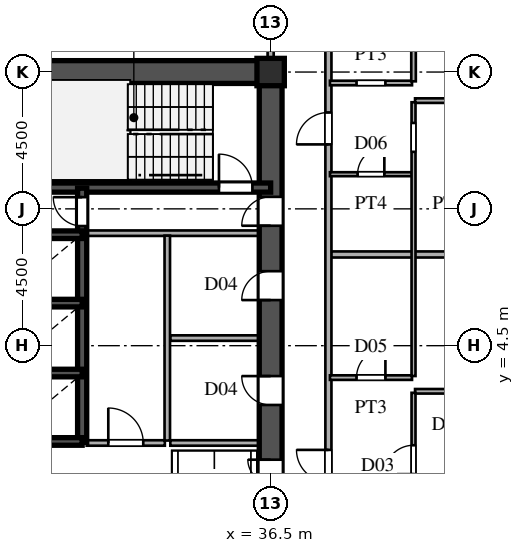
"""IFC4 building model, lengths in metres.
Left out: names, types, materials, properties, quantities, classifications, styles, units other than length and angle.
Written with IfcOpenShell. Run it as: python <this file> out.ifc"""

import sys

from ifc_helpers import new_model, si_unit, direction, frame, frame_2d, origin, origin_2d, place, context, subcontext, project, spatial, rectangle, i_section, extrude, source, transform, mapped, element, fill, save


model = new_model("IFC4")
c1 = context("Model", 3, precision=1e-05, world=origin(), true_north=direction((0.0, 1.0)))
c2 = subcontext(c1, "Body", "Model", "MODEL_VIEW")
j1 = project(units=[si_unit("LENGTHUNIT", "METRE"), si_unit("PLANEANGLEUNIT", "RADIAN")], contexts=[c1])
p1 = place(None, origin())
s1 = spatial("IfcSite", under=j1, at=p1, CompositionType="ELEMENT")
p2 = place(p1, origin())
s2 = spatial("IfcBuilding", under=s1, at=p2, CompositionType="ELEMENT")
p3 = place(p2, frame((0.0, 0.0, 29.7)))
s3 = spatial("IfcBuildingStorey", under=s2, at=p3, CompositionType="ELEMENT", Elevation=29.7)
m1 = source(origin(), c2, "Body", "SweptSolid", [
    extrude(i_section(OverallWidth=0.9, OverallDepth=0.9, WebThickness=0.036, FlangeThickness=0.055, at=origin_2d()), origin(), (0.0, 0.0, 1.0), 3.6),
])
p4 = place(p3, frame((36.5, 13.5, 0.0), z_axis=(0.0, 0.0, 1.0), x_axis=(1.0, 0.0, 0.0)))
e1 = element("IfcColumn", 1, at=p4, inside=s3, PredefinedType="COLUMN", context=c2, shape_type="MappedRepresentation", body=[
    mapped(m1, transform((0.0, 0.0, 0.0), scale=1.0)),
])
p5 = place(p3, frame((27.5, 13.5, 0.0), z_axis=(0.0, 0.0, 1.0), x_axis=(1.0, 0.0, 0.0)))
e2 = element("IfcWall", 2, at=p5, inside=s3, PredefinedType="SHEAR", context=c2, shape_type="SweptSolid", body=[
    extrude(rectangle(XDim=9.0, YDim=0.75, at=frame_2d((4.5, 0.0))), origin(), (0.0, 0.0, 1.0), 3.38),
])
p6 = place(p3, frame((36.5, -1.3, 0.0), z_axis=(0.0, 0.0, 1.0), x_axis=(0.0, 1.0, 0.0)))
e3 = element("IfcWall", 3, at=p6, inside=s3, PredefinedType="SHEAR", context=c2, shape_type="SweptSolid", body=[
    extrude(rectangle(XDim=2.6, YDim=0.75, at=frame_2d((1.3, 0.0))), origin(), (0.0, 0.0, 1.0), 3.38),
])
p7 = place(p6, frame((0.55, 0.0, 0.0)))
e4 = element("IfcOpeningElement", 4, at=p7, cuts=e3, PredefinedType="OPENING", context=c2, shape_type="SweptSolid", body=[
    extrude(rectangle(XDim=1.5, YDim=2.3, at=frame_2d((0.75, 1.15))), frame((0.0, 0.385, 0.0), z_axis=(0.0, -1.0, 0.0), x_axis=(1.0, 0.0, 0.0)), (0.0, 0.0, 1.0), 0.77),
])
p8 = place(p3, frame((36.5, 8.2, 0.0), z_axis=(0.0, 0.0, 1.0), x_axis=(0.0, 1.0, 0.0)))
e5 = element("IfcWall", 5, at=p8, inside=s3, PredefinedType="SHEAR", context=c2, shape_type="SweptSolid", body=[
    extrude(rectangle(XDim=5.45, YDim=0.75, at=frame_2d((2.725, 0.0))), origin(), (0.0, 0.0, 1.0), 3.38),
])
p9 = place(p8, frame((0.245, 0.0, 0.0)))
e6 = element("IfcOpeningElement", 6, at=p9, cuts=e5, PredefinedType="OPENING", context=c2, shape_type="SweptSolid", body=[
    extrude(rectangle(XDim=0.95, YDim=2.15, at=frame_2d((0.475, 1.075))), frame((0.0, 0.385, 0.0), z_axis=(0.0, -1.0, 0.0), x_axis=(1.0, 0.0, 0.0)), (0.0, 0.0, 1.0), 0.77),
])
p10 = place(p3, frame((36.5, 1.3, 0.0), z_axis=(0.0, 0.0, 1.0), x_axis=(0.0, 1.0, 0.0)))
e7 = element("IfcWall", 7, at=p10, inside=s3, PredefinedType="SHEAR", context=c2, shape_type="SweptSolid", body=[
    extrude(rectangle(XDim=3.45, YDim=0.75, at=frame_2d((1.725, 0.0))), origin(), (0.0, 0.0, 1.0), 3.38),
])
p11 = place(p10, frame((1.25, 0.0, 0.0)))
e8 = element("IfcOpeningElement", 8, at=p11, cuts=e7, PredefinedType="OPENING", context=c2, shape_type="SweptSolid", body=[
    extrude(rectangle(XDim=0.95, YDim=2.15, at=frame_2d((0.475, 1.075))), frame((0.0, 0.385, 0.0), z_axis=(0.0, -1.0, 0.0), x_axis=(1.0, 0.0, 0.0)), (0.0, 0.0, 1.0), 0.77),
])
p12 = place(p3, frame((36.5, 4.75, 0.0), z_axis=(0.0, 0.0, 1.0), x_axis=(0.0, 1.0, 0.0)))
e9 = element("IfcWall", 9, at=p12, inside=s3, PredefinedType="SHEAR", context=c2, shape_type="SweptSolid", body=[
    extrude(rectangle(XDim=3.45, YDim=0.75, at=frame_2d((1.725, 0.0))), origin(), (0.0, 0.0, 1.0), 3.38),
])
p13 = place(p12, frame((1.25, 0.0, 0.0)))
e10 = element("IfcOpeningElement", 10, at=p13, cuts=e9, PredefinedType="OPENING", context=c2, shape_type="SweptSolid", body=[
    extrude(rectangle(XDim=0.95, YDim=2.15, at=frame_2d((0.475, 1.075))), frame((0.0, 0.385, 0.0), z_axis=(0.0, -1.0, 0.0), x_axis=(1.0, 0.0, 0.0)), (0.0, 0.0, 1.0), 0.77),
])
p14 = place(p3, frame((27.5, 9.7, 0.0), z_axis=(0.0, 0.0, 1.0), x_axis=(1.0, 0.0, 0.0)))
e11 = element("IfcWall", 11, at=p14, inside=s3, PredefinedType="SHEAR", context=c2, shape_type="SweptSolid", body=[
    extrude(rectangle(XDim=9.0, YDim=0.3, at=frame_2d((4.5, 0.0))), origin(), (0.0, 0.0, 1.0), 3.38),
])
p15 = place(p14, frame((7.3, 0.0, 0.0)))
e12 = element("IfcOpeningElement", 12, at=p15, cuts=e11, PredefinedType="OPENING", context=c2, shape_type="SweptSolid", body=[
    extrude(rectangle(XDim=1.1, YDim=2.2, at=frame_2d((0.55, 1.1))), frame((0.0, 0.16, 0.0), z_axis=(0.0, -1.0, 0.0), x_axis=(1.0, 0.0, 0.0)), (0.0, 0.0, 1.0), 0.32),
])
for number, where, z_axis, x_axis in (
    (13, (27.5, 1.35, 0.0), (0.0, 0.0, 1.0), (1.0, 0.0, 0.0)),
    (14, (27.5, 3.6, 0.0), (0.0, 0.0, 1.0), (1.0, 0.0, 0.0)),
    (15, (27.5, 5.9, 0.0), (0.0, 0.0, 1.0), (1.0, 0.0, 0.0)),
    (16, (27.5, 8.15, 0.0), (0.0, 0.0, 1.0), (1.0, 0.0, 0.0)),
):
    element("IfcWall", number, at=place(p3, frame(where, z_axis=z_axis, x_axis=x_axis)), inside=s3, PredefinedType="SHEAR", context=c2, shape_type="SweptSolid", body=[
        extrude(rectangle(XDim=2.8, YDim=0.25, at=frame_2d((1.4, 0.0))), origin(), (0.0, 0.0, 1.0), 3.38),
    ])
p16 = place(p3, frame((30.3, 1.32, 0.0), z_axis=(0.0, 0.0, 1.0), x_axis=(0.0, 1.0, 0.0)))
e17 = element("IfcWall", 17, at=p16, inside=s3, PredefinedType="SHEAR", context=c2, shape_type="SweptSolid", body=[
    extrude(rectangle(XDim=2.28, YDim=0.3, at=frame_2d((1.14, 0.0))), origin(), (0.0, 0.0, 1.0), 3.38),
])
p17 = place(p3, frame((30.3, 3.6, 0.0), z_axis=(0.0, 0.0, 1.0), x_axis=(0.0, 1.0, 0.0)))
e18 = element("IfcWall", 18, at=p17, inside=s3, PredefinedType="SHEAR", context=c2, shape_type="SweptSolid", body=[
    extrude(rectangle(XDim=2.3, YDim=0.3, at=frame_2d((1.15, 0.0))), origin(), (0.0, 0.0, 1.0), 3.38),
])
p18 = place(p3, frame((30.3, 5.9, 0.0), z_axis=(0.0, 0.0, 1.0), x_axis=(0.0, 1.0, 0.0)))
e19 = element("IfcWall", 19, at=p18, inside=s3, PredefinedType="SHEAR", context=c2, shape_type="SweptSolid", body=[
    extrude(rectangle(XDim=2.25, YDim=0.3, at=frame_2d((1.125, 0.0))), origin(), (0.0, 0.0, 1.0), 3.38),
])
p19 = place(p3, frame((30.3, 8.15, 0.0), z_axis=(0.0, 0.0, 1.0), x_axis=(0.0, 1.0, 0.0)))
e20 = element("IfcWall", 20, at=p19, inside=s3, PredefinedType="SHEAR", context=c2, shape_type="SweptSolid", body=[
    extrude(rectangle(XDim=1.53, YDim=0.3, at=frame_2d((0.765, 0.0))), origin(), (0.0, 0.0, 1.0), 3.38),
])
p20 = place(p19, frame((0.285, 0.0, 0.0)))
e21 = element("IfcOpeningElement", 21, at=p20, cuts=e20, PredefinedType="OPENING", context=c2, shape_type="SweptSolid", body=[
    extrude(rectangle(XDim=0.95, YDim=2.15, at=frame_2d((0.475, 1.075))), frame((0.0, 0.16, 0.0), z_axis=(0.0, -1.0, 0.0), x_axis=(1.0, 0.0, 0.0)), (0.0, 0.0, 1.0), 0.32),
])
p21 = place(p3, frame((30.45, 8.2, 0.0), z_axis=(0.0, 0.0, 1.0), x_axis=(1.0, 0.0, 0.0)))
e22 = element("IfcWall", 22, at=p21, inside=s3, PredefinedType="PARTITIONING", context=c2, shape_type="SweptSolid", body=[
    extrude(rectangle(XDim=5.7, YDim=0.18, at=frame_2d((2.85, 0.0))), origin(), (0.0, 0.0, 1.0), 3.38),
])
p22 = place(p3, frame((33.1, 1.38, 0.0), z_axis=(0.0, 0.0, 1.0), x_axis=(0.0, 1.0, 0.0)))
e23 = element("IfcWall", 23, at=p22, inside=s3, PredefinedType="PARTITIONING", context=c2, shape_type="SweptSolid", body=[
    extrude(rectangle(XDim=6.74, YDim=0.18, at=frame_2d((3.37, 0.0))), origin(), (0.0, 0.0, 1.0), 3.38),
])
p23 = place(p3, frame((30.45, 1.3, 0.0), z_axis=(0.0, 0.0, 1.0), x_axis=(1.0, 0.0, 0.0)))
e24 = element("IfcWall", 24, at=p23, inside=s3, PredefinedType="PARTITIONING", context=c2, shape_type="SweptSolid", body=[
    extrude(rectangle(XDim=2.57, YDim=0.18, at=frame_2d((1.285, 0.0))), origin(), (0.0, 0.0, 1.0), 3.38),
])
p24 = place(p23, frame((0.71, 0.0, 0.0)))
e25 = element("IfcOpeningElement", 25, at=p24, cuts=e24, PredefinedType="OPENING", context=c2, shape_type="SweptSolid", body=[
    extrude(rectangle(XDim=1.15, YDim=2.2, at=frame_2d((0.575, 1.1))), frame((0.0, 0.1, 0.0), z_axis=(0.0, -1.0, 0.0), x_axis=(1.0, 0.0, 0.0)), (0.0, 0.0, 1.0), 0.2),
])
for number, where, z_axis, x_axis in (
    (26, (33.2, 1.3, 0.0), (0.0, 0.0, 1.0), (1.0, 0.0, 0.0)),
    (27, (33.2, 4.75, 0.0), (0.0, 0.0, 1.0), (1.0, 0.0, 0.0)),
):
    element("IfcWall", number, at=place(p3, frame(where, z_axis=z_axis, x_axis=x_axis)), inside=s3, PredefinedType="PARTITIONING", context=c2, shape_type="SweptSolid", body=[
        extrude(rectangle(XDim=2.95, YDim=0.18, at=frame_2d((1.475, 0.0))), origin(), (0.0, 0.0, 1.0), 3.38),
    ])
p25 = place(p3, frame((41.25, 3.0, 0.0), z_axis=(0.0, 0.0, 1.0), x_axis=(1.0, 0.0, 0.0)))
e28 = element("IfcWall", 28, at=p25, inside=s3, PredefinedType="PARTITIONING", context=c2, shape_type="SweptSolid", body=[
    extrude(rectangle(XDim=31.285, YDim=0.15, at=frame_2d((15.643, 0.0))), origin(), (0.0, 0.0, 1.0), 3.38),
])
p26 = place(p25, frame((2.8, 0.0, 0.0)))
e29 = element("IfcOpeningElement", 29, at=p26, cuts=e28, PredefinedType="OPENING", context=c2, shape_type="SweptSolid", body=[
    extrude(rectangle(XDim=0.95, YDim=2.15, at=frame_2d((0.475, 1.075))), frame((0.0, 0.085, 0.0), z_axis=(0.0, -1.0, 0.0), x_axis=(1.0, 0.0, 0.0)), (0.0, 0.0, 1.0), 0.17),
])
p27 = place(p25, frame((15.625, 0.0, 0.0)))
e30 = element("IfcOpeningElement", 30, at=p27, cuts=e28, PredefinedType="OPENING", context=c2, shape_type="SweptSolid", body=[
    extrude(rectangle(XDim=0.95, YDim=2.15, at=frame_2d((0.475, 1.075))), frame((0.0, 0.085, 0.0), z_axis=(0.0, -1.0, 0.0), x_axis=(1.0, 0.0, 0.0)), (0.0, 0.0, 1.0), 0.17),
])
p28 = place(p3, frame((38.45, 3.45, 0.0), z_axis=(0.0, 0.0, 1.0), x_axis=(1.0, 0.0, 0.0)))
e31 = element("IfcWall", 31, at=p28, inside=s3, PredefinedType="PARTITIONING", context=c2, shape_type="SweptSolid", body=[
    extrude(rectangle(XDim=2.7, YDim=0.15, at=frame_2d((1.35, 0.0))), origin(), (0.0, 0.0, 1.0), 3.38),
])
p29 = place(p28, frame((0.875, 0.0, 0.0)))
e32 = element("IfcOpeningElement", 32, at=p29, cuts=e31, PredefinedType="OPENING", context=c2, shape_type="SweptSolid", body=[
    extrude(rectangle(XDim=0.95, YDim=2.15, at=frame_2d((0.475, 1.075))), frame((0.0, 0.085, 0.0), z_axis=(0.0, -1.0, 0.0), x_axis=(1.0, 0.0, 0.0)), (0.0, 0.0, 1.0), 0.17),
])
p30 = place(p3, frame((38.48, 7.5, 0.0), z_axis=(0.0, 0.0, 1.0), x_axis=(1.0, 0.0, 0.0)))
e33 = element("IfcWall", 33, at=p30, inside=s3, PredefinedType="PARTITIONING", context=c2, shape_type="SweptSolid", body=[
    extrude(rectangle(XDim=34.025, YDim=0.2, at=frame_2d((17.012, 0.0))), origin(), (0.0, 0.0, 1.0), 3.38),
])
p31 = place(p3, frame((38.45, 10.14, 0.0), z_axis=(0.0, 0.0, 1.0), x_axis=(1.0, 0.0, 0.0)))
e34 = element("IfcWall", 34, at=p31, inside=s3, PredefinedType="PARTITIONING", context=c2, shape_type="SweptSolid", body=[
    extrude(rectangle(XDim=2.7, YDim=0.13, at=frame_2d((1.35, 0.0))), origin(), (0.0, 0.0, 1.0), 3.38),
])
p32 = place(p31, frame((0.91, 0.0, 0.0)))
e35 = element("IfcOpeningElement", 35, at=p32, cuts=e34, PredefinedType="OPENING", context=c2, shape_type="SweptSolid", body=[
    extrude(rectangle(XDim=0.88, YDim=2.1, at=frame_2d((0.44, 1.05))), frame((0.0, 0.075, 0.0), z_axis=(0.0, -1.0, 0.0), x_axis=(1.0, 0.0, 0.0)), (0.0, 0.0, 1.0), 0.15),
])
p33 = place(p3, frame((41.25, 12.56, 0.0), z_axis=(0.0, 0.0, 1.0), x_axis=(1.0, 0.0, 0.0)))
e36 = element("IfcWall", 36, at=p33, inside=s3, PredefinedType="PARTITIONING", context=c2, shape_type="SweptSolid", body=[
    extrude(rectangle(XDim=24.969, YDim=0.15, at=frame_2d((12.484, 0.0))), origin(), (0.0, 0.0, 1.0), 3.38),
])
p34 = place(p33, frame((2.8, 0.0, 0.0)))
e37 = element("IfcOpeningElement", 37, at=p34, cuts=e36, PredefinedType="OPENING", context=c2, shape_type="SweptSolid", body=[
    extrude(rectangle(XDim=0.95, YDim=2.15, at=frame_2d((0.475, 1.075))), frame((0.0, 0.085, 0.0), z_axis=(0.0, -1.0, 0.0), x_axis=(1.0, 0.0, 0.0)), (0.0, 0.0, 1.0), 0.17),
])
p35 = place(p33, frame((15.625, 0.0, 0.0)))
e38 = element("IfcOpeningElement", 38, at=p35, cuts=e36, PredefinedType="OPENING", context=c2, shape_type="SweptSolid", body=[
    extrude(rectangle(XDim=0.95, YDim=2.15, at=frame_2d((0.475, 1.075))), frame((0.0, 0.085, 0.0), z_axis=(0.0, -1.0, 0.0), x_axis=(1.0, 0.0, 0.0)), (0.0, 0.0, 1.0), 0.17),
])
p36 = place(p33, frame((9.45, 0.0, 0.0)))
e39 = element("IfcOpeningElement", 39, at=p36, cuts=e36, PredefinedType="OPENING", context=c2, shape_type="SweptSolid", body=[
    extrude(rectangle(XDim=0.95, YDim=2.15, at=frame_2d((0.475, 1.075))), frame((0.0, 0.085, 0.0), z_axis=(0.0, -1.0, 0.0), x_axis=(1.0, 0.0, 0.0)), (0.0, 0.0, 1.0), 0.17),
])
p37 = place(p3, frame((38.45, 13.14, 0.0), z_axis=(0.0, 0.0, 1.0), x_axis=(1.0, 0.0, 0.0)))
e40 = element("IfcWall", 40, at=p37, inside=s3, PredefinedType="PARTITIONING", context=c2, shape_type="SweptSolid", body=[
    extrude(rectangle(XDim=2.7, YDim=0.15, at=frame_2d((1.35, 0.0))), origin(), (0.0, 0.0, 1.0), 3.38),
])
p38 = place(p37, frame((0.875, 0.0, 0.0)))
e41 = element("IfcOpeningElement", 41, at=p38, cuts=e40, PredefinedType="OPENING", context=c2, shape_type="SweptSolid", body=[
    extrude(rectangle(XDim=0.95, YDim=2.15, at=frame_2d((0.475, 1.075))), frame((0.0, 0.085, 0.0), z_axis=(0.0, -1.0, 0.0), x_axis=(1.0, 0.0, 0.0)), (0.0, 0.0, 1.0), 0.17),
])
p39 = place(p3, frame((36.5, 13.88, 0.0), z_axis=(0.0, 0.0, 1.0), x_axis=(0.0, 1.0, 0.0)))
e42 = element("IfcWall", 42, at=p39, inside=s3, PredefinedType="PARTITIONING", context=c2, shape_type="SweptSolid", body=[
    extrude(rectangle(XDim=1.635, YDim=0.2, at=frame_2d((0.817, 0.0))), origin(), (0.0, 0.0, 1.0), 2.68),
])
p40 = place(p3, frame((38.4, -15.515, 0.0), z_axis=(0.0, 0.0, 1.0), x_axis=(0.0, 1.0, 0.0)))
e43 = element("IfcWall", 43, at=p40, inside=s3, PredefinedType="PARTITIONING", context=c2, shape_type="SweptSolid", body=[
    extrude(rectangle(XDim=31.03, YDim=0.2, at=frame_2d((15.515, 0.0))), origin(), (0.0, 0.0, 1.0), 3.38),
])
p41 = place(p40, frame((4.163, 0.0, 0.0)))
e44 = element("IfcOpeningElement", 44, at=p41, cuts=e43, PredefinedType="OPENING", context=c2, shape_type="SweptSolid", body=[
    extrude(rectangle(XDim=1.05, YDim=2.25, at=frame_2d((0.525, 1.125))), frame((0.0, 0.11, 0.0), z_axis=(0.0, -1.0, 0.0), x_axis=(1.0, 0.0, 0.0)), (0.0, 0.0, 1.0), 0.22),
])
p42 = place(p40, frame((15.538, 0.0, 0.0)))
e45 = element("IfcOpeningElement", 45, at=p42, cuts=e43, PredefinedType="OPENING", context=c2, shape_type="SweptSolid", body=[
    extrude(rectangle(XDim=1.05, YDim=2.25, at=frame_2d((0.525, 1.125))), frame((0.0, 0.11, 0.0), z_axis=(0.0, -1.0, 0.0), x_axis=(1.0, 0.0, 0.0)), (0.0, 0.0, 1.0), 0.22),
])
p43 = place(p40, frame((26.635, 0.0, 0.0)))
e46 = element("IfcOpeningElement", 46, at=p43, cuts=e43, PredefinedType="OPENING", context=c2, shape_type="SweptSolid", body=[
    extrude(rectangle(XDim=1.05, YDim=2.25, at=frame_2d((0.525, 1.125))), frame((0.0, 0.11, 0.0), z_axis=(0.0, -1.0, 0.0), x_axis=(1.0, 0.0, 0.0)), (0.0, 0.0, 1.0), 0.22),
])
p44 = place(p3, frame((41.2, -11.506, 0.0), z_axis=(0.0, 0.0, 1.0), x_axis=(0.0, 1.0, 0.0)))
e47 = element("IfcWall", 47, at=p44, inside=s3, PredefinedType="PARTITIONING", context=c2, shape_type="SweptSolid", body=[
    extrude(rectangle(XDim=14.456, YDim=0.13, at=frame_2d((7.228, 0.0))), origin(), (0.0, 0.0, 1.0), 3.38),
])
p45 = place(p44, frame((0.589, 0.0, 0.0)))
e48 = element("IfcOpeningElement", 48, at=p45, cuts=e47, PredefinedType="OPENING", context=c2, shape_type="SweptSolid", body=[
    extrude(rectangle(XDim=0.95, YDim=2.15, at=frame_2d((0.475, 1.075))), frame((0.0, 0.075, 0.0), z_axis=(0.0, -1.0, 0.0), x_axis=(1.0, 0.0, 0.0)), (0.0, 0.0, 1.0), 0.15),
])
p46 = place(p44, frame((11.781, 0.0, 0.0)))
e49 = element("IfcOpeningElement", 49, at=p46, cuts=e47, PredefinedType="OPENING", context=c2, shape_type="SweptSolid", body=[
    extrude(rectangle(XDim=0.95, YDim=2.15, at=frame_2d((0.475, 1.075))), frame((0.0, 0.075, 0.0), z_axis=(0.0, -1.0, 0.0), x_axis=(1.0, 0.0, 0.0)), (0.0, 0.0, 1.0), 0.15),
])
p47 = place(p3, frame((41.2, 3.502, 0.0), z_axis=(0.0, 0.0, 1.0), x_axis=(0.0, 1.0, 0.0)))
e50 = element("IfcWall", 50, at=p47, inside=s3, PredefinedType="PARTITIONING", context=c2, shape_type="SweptSolid", body=[
    extrude(rectangle(XDim=9.004, YDim=0.13, at=frame_2d((4.502, 0.0))), origin(), (0.0, 0.0, 1.0), 3.38),
])
p48 = place(p47, frame((7.374, 0.0, 0.0)))
e51 = element("IfcOpeningElement", 51, at=p48, cuts=e50, PredefinedType="OPENING", context=c2, shape_type="SweptSolid", body=[
    extrude(rectangle(XDim=0.95, YDim=2.15, at=frame_2d((0.475, 1.075))), frame((0.0, 0.075, 0.0), z_axis=(0.0, -1.0, 0.0), x_axis=(1.0, 0.0, 0.0)), (0.0, 0.0, 1.0), 0.15),
])
p49 = place(p3, frame((41.2, 13.195, 0.0), z_axis=(0.0, 0.0, 1.0), x_axis=(0.0, 1.0, 0.0)))
e52 = element("IfcWall", 52, at=p49, inside=s3, PredefinedType="PARTITIONING", context=c2, shape_type="SweptSolid", body=[
    extrude(rectangle(XDim=9.509, YDim=0.15, at=frame_2d((4.754, 0.0))), origin(), (0.0, 0.0, 1.0), 3.38),
])
m2 = source(origin(), c2, "Body", "SweptSolid", [
    extrude(rectangle(XDim=1.5, YDim=2.3, at=frame_2d((0.75, 1.15))), frame((0.0, 0.025, 0.0), z_axis=(0.0, -1.0, 0.0), x_axis=(1.0, 0.0, 0.0)), (0.0, 0.0, 1.0), 0.05),
])
p50 = place(p7, origin())
e53 = element("IfcDoor", 53, at=p50, inside=s3, OperationType="DOUBLE_SWING_LEFT", PredefinedType="DOOR", context=c2, shape_type="MappedRepresentation", body=[
    mapped(m2, transform((0.0, 0.0, 0.0), scale=1.0)),
])
fill(e4, e53)
m3 = source(origin(), c2, "Body", "SweptSolid", [
    extrude(rectangle(XDim=0.95, YDim=2.15, at=frame_2d((0.475, 1.075))), frame((0.0, 0.025, 0.0), z_axis=(0.0, -1.0, 0.0), x_axis=(1.0, 0.0, 0.0)), (0.0, 0.0, 1.0), 0.05),
])
p51 = place(p9, origin())
e54 = element("IfcDoor", 54, at=p51, inside=s3, OperationType="SINGLE_SWING_LEFT", PredefinedType="DOOR", context=c2, shape_type="MappedRepresentation", body=[
    mapped(m3, transform((0.0, 0.0, 0.0), scale=1.0)),
])
fill(e6, e54)
p52 = place(p11, origin())
e55 = element("IfcDoor", 55, at=p52, inside=s3, OperationType="SINGLE_SWING_RIGHT", PredefinedType="DOOR", context=c2, shape_type="MappedRepresentation", body=[
    mapped(m3, transform((0.0, 0.0, 0.0), scale=1.0)),
])
fill(e8, e55)
p53 = place(p13, origin())
e56 = element("IfcDoor", 56, at=p53, inside=s3, OperationType="SINGLE_SWING_LEFT", PredefinedType="DOOR", context=c2, shape_type="MappedRepresentation", body=[
    mapped(m3, transform((0.0, 0.0, 0.0), scale=1.0)),
])
fill(e10, e56)
m4 = source(origin(), c2, "Body", "SweptSolid", [
    extrude(rectangle(XDim=1.1, YDim=2.2, at=frame_2d((0.55, 1.1))), frame((0.0, 0.025, 0.0), z_axis=(0.0, -1.0, 0.0), x_axis=(1.0, 0.0, 0.0)), (0.0, 0.0, 1.0), 0.05),
])
p54 = place(p15, origin())
e57 = element("IfcDoor", 57, at=p54, inside=s3, OperationType="SINGLE_SWING_LEFT", PredefinedType="DOOR", context=c2, shape_type="MappedRepresentation", body=[
    mapped(m4, transform((0.0, 0.0, 0.0), scale=1.0)),
])
fill(e12, e57)
p55 = place(p20, origin())
e58 = element("IfcDoor", 58, at=p55, inside=s3, OperationType="SINGLE_SWING_RIGHT", PredefinedType="DOOR", context=c2, shape_type="MappedRepresentation", body=[
    mapped(m3, transform((0.0, 0.0, 0.0), scale=1.0)),
])
fill(e21, e58)
m5 = source(origin(), c2, "Body", "SweptSolid", [
    extrude(rectangle(XDim=1.15, YDim=2.2, at=frame_2d((0.575, 1.1))), frame((0.0, 0.025, 0.0), z_axis=(0.0, -1.0, 0.0), x_axis=(1.0, 0.0, 0.0)), (0.0, 0.0, 1.0), 0.05),
])
p56 = place(p24, origin())
e59 = element("IfcDoor", 59, at=p56, inside=s3, OperationType="SINGLE_SWING_LEFT", PredefinedType="DOOR", context=c2, shape_type="MappedRepresentation", body=[
    mapped(m5, transform((0.0, 0.0, 0.0), scale=1.0)),
])
fill(e25, e59)
m6 = source(origin(), c2, "Body", "SweptSolid", [
    extrude(rectangle(XDim=0.95, YDim=2.15, at=frame_2d((0.475, 1.075))), frame((0.0, 0.025, 0.0), z_axis=(0.0, -1.0, 0.0), x_axis=(1.0, 0.0, 0.0)), (0.0, 0.0, 1.0), 0.05),
])
p57 = place(p29, origin())
e60 = element("IfcDoor", 60, at=p57, inside=s3, OperationType="SINGLE_SWING_RIGHT", PredefinedType="DOOR", context=c2, shape_type="MappedRepresentation", body=[
    mapped(m6, transform((0.0, 0.0, 0.0), scale=1.0)),
])
fill(e32, e60)
m7 = source(origin(), c2, "Body", "SweptSolid", [
    extrude(rectangle(XDim=0.88, YDim=2.1, at=frame_2d((0.44, 1.05))), frame((0.0, 0.025, 0.0), z_axis=(0.0, -1.0, 0.0), x_axis=(1.0, 0.0, 0.0)), (0.0, 0.0, 1.0), 0.05),
])
p58 = place(p32, origin())
e61 = element("IfcDoor", 61, at=p58, inside=s3, OperationType="SINGLE_SWING_RIGHT", PredefinedType="DOOR", context=c2, shape_type="MappedRepresentation", body=[
    mapped(m7, transform((0.0, 0.0, 0.0), scale=1.0)),
])
fill(e35, e61)
m8 = source(origin(), c2, "Body", "SweptSolid", [
    extrude(rectangle(XDim=1.05, YDim=2.25, at=frame_2d((0.525, 1.125))), frame((0.0, 0.025, 0.0), z_axis=(0.0, -1.0, 0.0), x_axis=(1.0, 0.0, 0.0)), (0.0, 0.0, 1.0), 0.05),
])
p59 = place(p42, origin())
e62 = element("IfcDoor", 62, at=p59, inside=s3, OperationType="SINGLE_SWING_RIGHT", PredefinedType="DOOR", context=c2, shape_type="MappedRepresentation", body=[
    mapped(m8, transform((0.0, 0.0, 0.0), scale=1.0)),
])
fill(e45, e62)
p60 = place(p43, origin())
e63 = element("IfcDoor", 63, at=p60, inside=s3, OperationType="SINGLE_SWING_LEFT", PredefinedType="DOOR", context=c2, shape_type="MappedRepresentation", body=[
    mapped(m8, transform((0.0, 0.0, 0.0), scale=1.0)),
])
fill(e46, e63)
p61 = place(p46, origin())
e64 = element("IfcDoor", 64, at=p61, inside=s3, OperationType="SINGLE_SWING_LEFT", PredefinedType="DOOR", context=c2, shape_type="MappedRepresentation", body=[
    mapped(m6, transform((0.0, 0.0, 0.0), scale=1.0)),
])
fill(e49, e64)
save(model, sys.argv[1])
